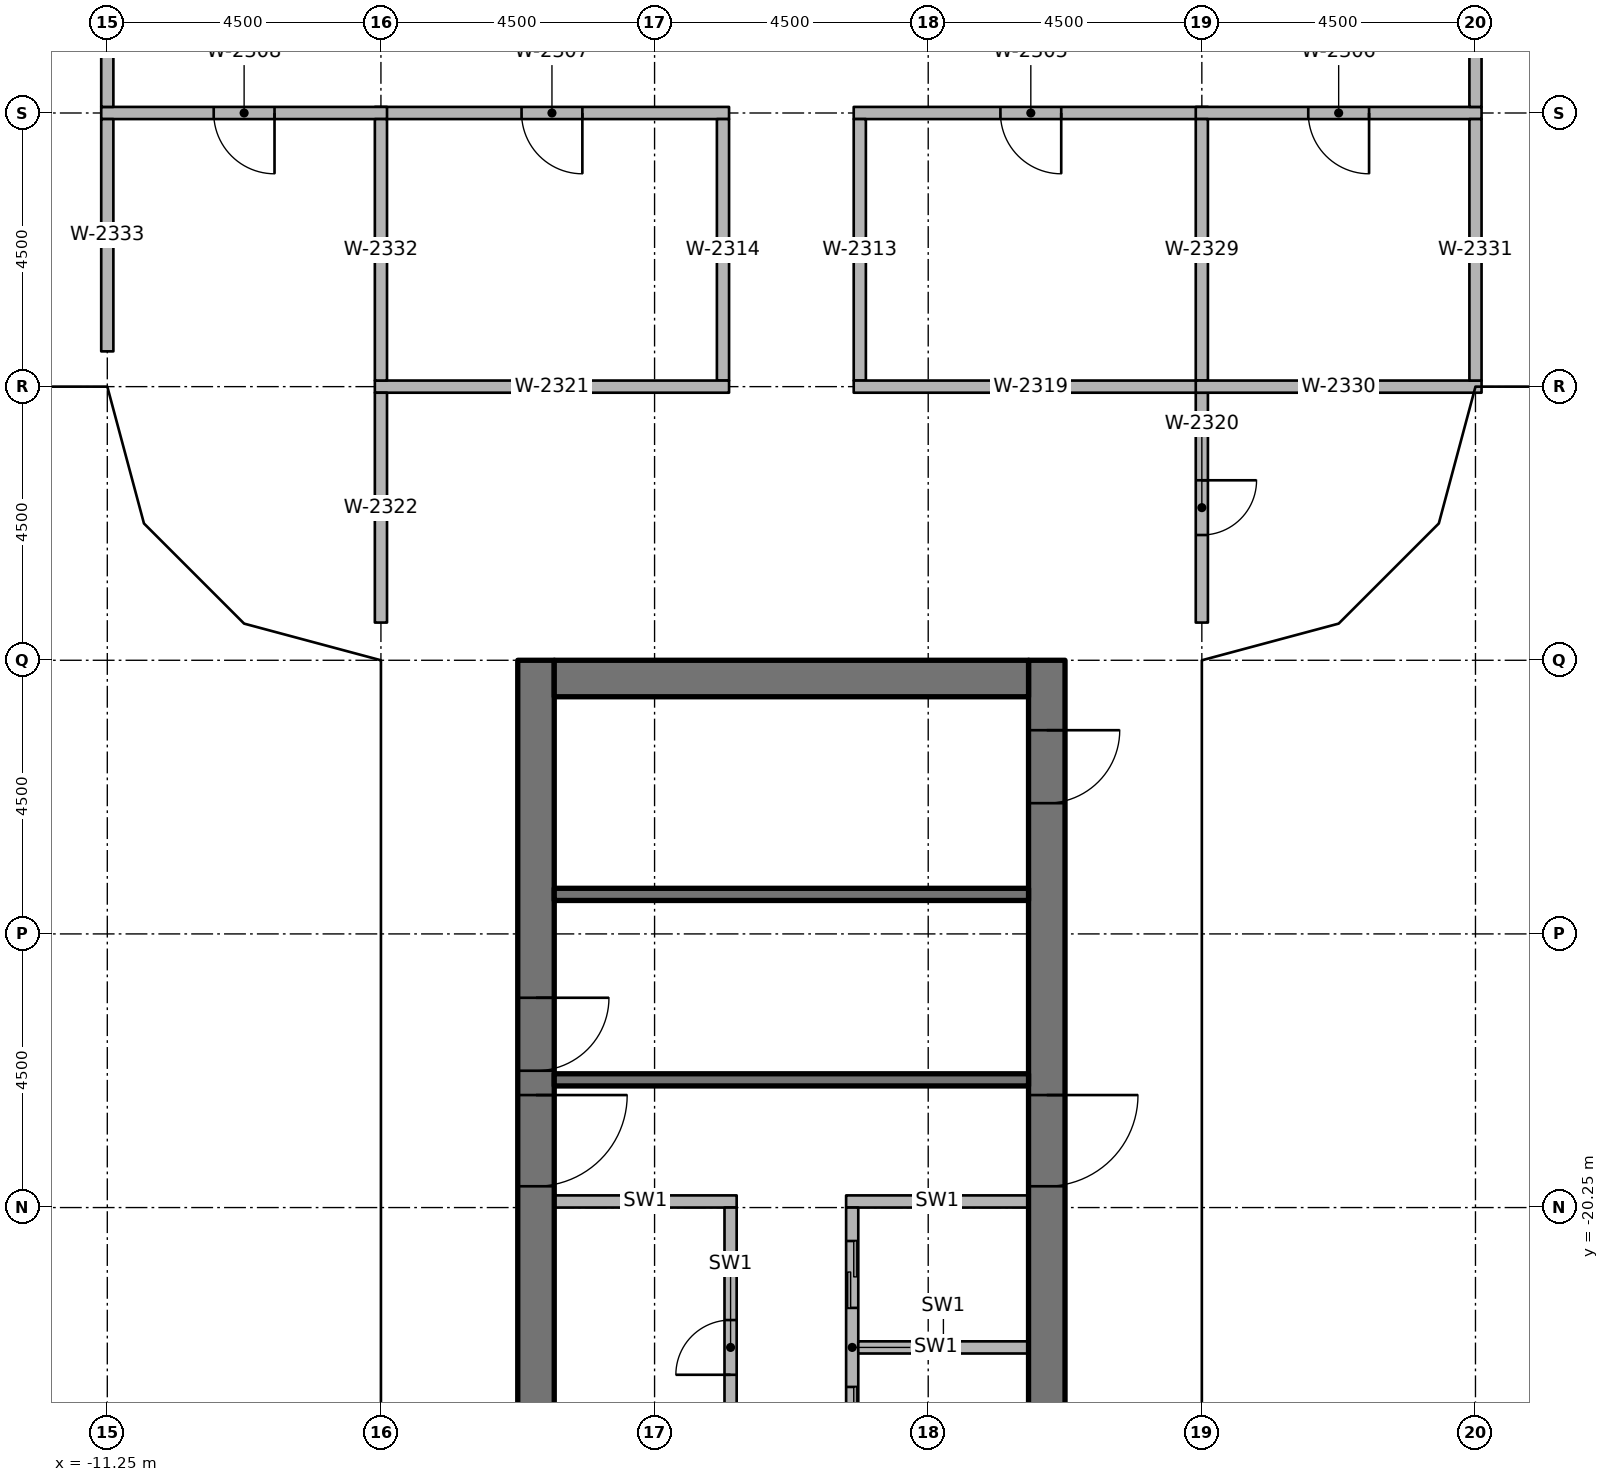
"""IFC4 building model, lengths in metres.
Left out: names, types, materials, properties, quantities, classifications, styles, units other than length and angle.
Written with IfcOpenShell. Run it as: python <this file> out.ifc"""

import sys

from ifc_helpers import new_model, si_unit, direction, frame, frame_2d, origin, origin_2d, place, context, subcontext, project, spatial, rectangle, extrude, element, fill, save


model = new_model("IFC4")
c1 = context("Model", 3, precision=1e-05, world=origin(), true_north=direction((0.0, 1.0)))
c2 = subcontext(c1, "Body", "Model", "MODEL_VIEW")
j1 = project(units=[si_unit("LENGTHUNIT", "METRE"), si_unit("PLANEANGLEUNIT", "RADIAN")], contexts=[c1])
p1 = place(None, origin())
s1 = spatial("IfcSite", under=j1, at=p1, CompositionType="ELEMENT")
p2 = place(p1, origin())
s2 = spatial("IfcBuilding", under=s1, at=p2, CompositionType="ELEMENT")
p3 = place(p2, frame((0.0, 0.0, 218.2)))
s3 = spatial("IfcBuildingStorey", under=s2, at=p3, CompositionType="ELEMENT", Elevation=218.2)
for number, where, z_axis, x_axis in (
    (1, (-10.75, -6.25, 0.0), (0.0, 0.0, 1.0), (1.0, 0.0, 0.0)),
    (2, (-6.25, -20.25, 0.0), (0.0, 0.0, 1.0), (1.0, 0.0, 0.0)),
    (3, (-6.25, -15.75, 0.0), (0.0, 0.0, 1.0), (1.0, 0.0, 0.0)),
    (4, (-6.25, -10.75, 0.0), (0.0, 0.0, 1.0), (1.0, 0.0, 0.0)),
    (5, (-6.25, -6.25, 0.0), (0.0, 0.0, 1.0), (1.0, 0.0, 0.0)),
    (6, (6.25, -20.25, 0.0), (0.0, 0.0, 1.0), (1.0, 0.0, 0.0)),
    (7, (6.25, -15.75, 0.0), (0.0, 0.0, 1.0), (1.0, 0.0, 0.0)),
    (8, (6.25, -10.75, 0.0), (0.0, 0.0, 1.0), (1.0, 0.0, 0.0)),
    (9, (6.25, -6.25, 0.0), (0.0, 0.0, 1.0), (1.0, 0.0, 0.0)),
    (10, (10.75, -6.25, 0.0), (0.0, 0.0, 1.0), (1.0, 0.0, 0.0)),
):
    element("IfcColumn", number, at=place(p3, frame(where, z_axis=z_axis, x_axis=x_axis)), inside=s3, PredefinedType="COLUMN", context=c2, shape_type="SweptSolid", body=[
        extrude(rectangle(XDim=0.7, YDim=0.7, at=origin_2d()), origin(), (0.0, 0.0, 1.0), 3.65),
    ])
p4 = place(p3, frame((-4.2, -11.25, 0.0), z_axis=(0.0, 0.0, 1.0), x_axis=(0.0, -1.0, 0.0)))
e11 = element("IfcWall", 11, at=p4, inside=s3, PredefinedType="SHEAR", context=c2, shape_type="SweptSolid", body=[
    extrude(rectangle(XDim=15.0, YDim=0.6, at=frame_2d((7.5, 0.0))), origin(), (0.0, 0.0, 1.0), 3.8),
])
p5 = place(p4, frame((7.15, 0.0, 0.0)))
e12 = element("IfcOpeningElement", 12, at=p5, cuts=e11, PredefinedType="OPENING", context=c2, shape_type="SweptSolid", body=[
    extrude(rectangle(XDim=1.5, YDim=2.3, at=frame_2d((0.75, 1.15))), frame((0.0, 0.31, 0.0), z_axis=(0.0, -1.0, 0.0), x_axis=(1.0, 0.0, 0.0)), (0.0, 0.0, 1.0), 0.62),
])
p6 = place(p4, frame((5.55, 0.0, 0.0)))
e13 = element("IfcOpeningElement", 13, at=p6, cuts=e11, PredefinedType="OPENING", context=c2, shape_type="SweptSolid", body=[
    extrude(rectangle(XDim=1.2, YDim=2.1, at=frame_2d((0.6, 1.05))), frame((0.0, 0.31, 0.0), z_axis=(0.0, -1.0, 0.0), x_axis=(1.0, 0.0, 0.0)), (0.0, 0.0, 1.0), 0.62),
])
p7 = place(p3, frame((4.2, -11.25, 0.0), z_axis=(0.0, 0.0, 1.0), x_axis=(0.0, -1.0, 0.0)))
e14 = element("IfcWall", 14, at=p7, inside=s3, PredefinedType="SHEAR", context=c2, shape_type="SweptSolid", body=[
    extrude(rectangle(XDim=15.0, YDim=0.6, at=frame_2d((7.5, 0.0))), origin(), (0.0, 0.0, 1.0), 3.8),
])
p8 = place(p7, frame((7.15, 0.0, 0.0)))
e15 = element("IfcOpeningElement", 15, at=p8, cuts=e14, PredefinedType="OPENING", context=c2, shape_type="SweptSolid", body=[
    extrude(rectangle(XDim=1.5, YDim=2.3, at=frame_2d((0.75, 1.15))), frame((0.0, 0.31, 0.0), z_axis=(0.0, -1.0, 0.0), x_axis=(1.0, 0.0, 0.0)), (0.0, 0.0, 1.0), 0.62),
])
p9 = place(p7, frame((13.9, 0.0, 0.0)))
e16 = element("IfcOpeningElement", 16, at=p9, cuts=e14, PredefinedType="OPENING", context=c2, shape_type="SweptSolid", body=[
    extrude(rectangle(XDim=0.9, YDim=2.1, at=frame_2d((0.45, 1.05))), frame((0.0, 0.31, 0.0), z_axis=(0.0, -1.0, 0.0), x_axis=(1.0, 0.0, 0.0)), (0.0, 0.0, 1.0), 0.62),
])
p10 = place(p7, frame((1.15, 0.0, 0.0)))
e17 = element("IfcOpeningElement", 17, at=p10, cuts=e14, PredefinedType="OPENING", context=c2, shape_type="SweptSolid", body=[
    extrude(rectangle(XDim=1.2, YDim=2.1, at=frame_2d((0.6, 1.05))), frame((0.0, 0.31, 0.0), z_axis=(0.0, -1.0, 0.0), x_axis=(1.0, 0.0, 0.0)), (0.0, 0.0, 1.0), 0.62),
])
p11 = place(p3, frame((-3.9, -11.55, 0.0), z_axis=(0.0, 0.0, 1.0), x_axis=(1.0, 0.0, 0.0)))
e18 = element("IfcWall", 18, at=p11, inside=s3, PredefinedType="SHEAR", context=c2, shape_type="SweptSolid", body=[
    extrude(rectangle(XDim=7.8, YDim=0.6, at=frame_2d((3.9, 0.0))), origin(), (0.0, 0.0, 1.0), 3.8),
])
for number, where, z_axis, x_axis in (
    (19, (3.9, -18.15, 0.0), (0.0, 0.0, 1.0), (-1.0, 0.0, 0.0)),
    (20, (3.9, -15.1, 0.0), (0.0, 0.0, 1.0), (-1.0, 0.0, 0.0)),
):
    element("IfcWall", number, at=place(p3, frame(where, z_axis=z_axis, x_axis=x_axis)), inside=s3, PredefinedType="SHEAR", context=c2, shape_type="SweptSolid", body=[
        extrude(rectangle(XDim=7.8, YDim=0.2, at=frame_2d((3.9, 0.0))), origin(), (0.0, 0.0, 1.0), 3.65),
    ])
p12 = place(p3, frame((3.9, -20.15, 0.0), z_axis=(0.0, 0.0, 1.0), x_axis=(-1.0, 0.0, 0.0)))
e21 = element("IfcWall", 21, at=p12, inside=s3, PredefinedType="PARTITIONING", context=c2, shape_type="SweptSolid", body=[
    extrude(rectangle(XDim=3.0, YDim=0.2, at=frame_2d((1.5, 0.0))), origin(), (0.0, 0.0, 1.0), 3.65),
])
p13 = place(p3, frame((1.0, -24.85, 0.0), z_axis=(0.0, 0.0, 1.0), x_axis=(0.0, 1.0, 0.0)))
e22 = element("IfcWall", 22, at=p13, inside=s3, PredefinedType="PARTITIONING", context=c2, shape_type="SweptSolid", body=[
    extrude(rectangle(XDim=4.6, YDim=0.2, at=frame_2d((2.3, 0.0))), origin(), (0.0, 0.0, 1.0), 3.65),
])
p14 = place(p13, frame((0.55, 0.0, 0.0)))
e23 = element("IfcOpeningElement", 23, at=p14, cuts=e22, PredefinedType="OPENING", context=c2, shape_type="SweptSolid", body=[
    extrude(rectangle(XDim=1.1, YDim=2.3, at=frame_2d((0.55, 1.15))), frame((0.0, 0.11, 0.0), z_axis=(0.0, -1.0, 0.0), x_axis=(1.0, 0.0, 0.0)), (0.0, 0.0, 1.0), 0.22),
])
p15 = place(p13, frame((2.95, 0.0, 0.0)))
e24 = element("IfcOpeningElement", 24, at=p15, cuts=e22, PredefinedType="OPENING", context=c2, shape_type="SweptSolid", body=[
    extrude(rectangle(XDim=1.1, YDim=2.3, at=frame_2d((0.55, 1.15))), frame((0.0, 0.11, 0.0), z_axis=(0.0, -1.0, 0.0), x_axis=(1.0, 0.0, 0.0)), (0.0, 0.0, 1.0), 0.22),
])
p16 = place(p3, frame((-0.9, -20.15, 0.0), z_axis=(0.0, 0.0, 1.0), x_axis=(-1.0, 0.0, 0.0)))
e25 = element("IfcWall", 25, at=p16, inside=s3, PredefinedType="PARTITIONING", context=c2, shape_type="SweptSolid", body=[
    extrude(rectangle(XDim=3.0, YDim=0.2, at=frame_2d((1.5, 0.0))), origin(), (0.0, 0.0, 1.0), 3.65),
])
p17 = place(p3, frame((-1.0, -24.85, 0.0), z_axis=(0.0, 0.0, 1.0), x_axis=(0.0, 1.0, 0.0)))
e26 = element("IfcWall", 26, at=p17, inside=s3, PredefinedType="PARTITIONING", context=c2, shape_type="SweptSolid", body=[
    extrude(rectangle(XDim=4.6, YDim=0.2, at=frame_2d((2.3, 0.0))), origin(), (0.0, 0.0, 1.0), 3.65),
])
p18 = place(p17, frame((1.85, 0.0, 0.0)))
e27 = element("IfcOpeningElement", 27, at=p18, cuts=e26, PredefinedType="OPENING", context=c2, shape_type="SweptSolid", body=[
    extrude(rectangle(XDim=0.9, YDim=2.1, at=frame_2d((0.45, 1.05))), frame((0.0, 0.11, 0.0), z_axis=(0.0, -1.0, 0.0), x_axis=(1.0, 0.0, 0.0)), (0.0, 0.0, 1.0), 0.22),
])
p19 = place(p3, frame((3.9, -22.55, 0.0), z_axis=(0.0, 0.0, 1.0), x_axis=(-1.0, 0.0, 0.0)))
e28 = element("IfcWall", 28, at=p19, inside=s3, PredefinedType="PARTITIONING", context=c2, shape_type="SweptSolid", body=[
    extrude(rectangle(XDim=2.8, YDim=0.2, at=frame_2d((1.4, 0.0))), origin(), (0.0, 0.0, 1.0), 3.65),
])
p20 = place(p3, frame((6.85, -2.25, 0.0), z_axis=(0.0, 0.0, 1.0), x_axis=(-1.0, 0.0, 0.0)))
e29 = element("IfcWall", 29, at=p20, inside=s3, PredefinedType="PARTITIONING", context=c2, shape_type="SweptSolid", body=[
    extrude(rectangle(XDim=5.825, YDim=0.2, at=frame_2d((2.913, 0.0))), origin(), (0.0, 0.0, 1.0), 2.75),
])
p21 = place(p20, frame((2.413, 0.0, 0.0)))
e30 = element("IfcOpeningElement", 30, at=p21, cuts=e29, PredefinedType="OPENING", context=c2, shape_type="SweptSolid", body=[
    extrude(rectangle(XDim=1.0, YDim=2.1, at=frame_2d((0.5, 1.05))), frame((0.0, 0.11, 0.0), z_axis=(0.0, -1.0, 0.0), x_axis=(1.0, 0.0, 0.0)), (0.0, 0.0, 1.0), 0.22),
])
p22 = place(p3, frame((11.35, -2.25, 0.0), z_axis=(0.0, 0.0, 1.0), x_axis=(-1.0, 0.0, 0.0)))
e31 = element("IfcWall", 31, at=p22, inside=s3, PredefinedType="PARTITIONING", context=c2, shape_type="SweptSolid", body=[
    extrude(rectangle(XDim=4.7, YDim=0.2, at=frame_2d((2.35, 0.0))), origin(), (0.0, 0.0, 1.0), 2.75),
])
p23 = place(p22, frame((1.85, 0.0, 0.0)))
e32 = element("IfcOpeningElement", 32, at=p23, cuts=e31, PredefinedType="OPENING", context=c2, shape_type="SweptSolid", body=[
    extrude(rectangle(XDim=1.0, YDim=2.1, at=frame_2d((0.5, 1.05))), frame((0.0, 0.11, 0.0), z_axis=(0.0, -1.0, 0.0), x_axis=(1.0, 0.0, 0.0)), (0.0, 0.0, 1.0), 0.22),
])
p24 = place(p3, frame((-1.025, -2.25, 0.0), z_axis=(0.0, 0.0, 1.0), x_axis=(-1.0, 0.0, 0.0)))
e33 = element("IfcWall", 33, at=p24, inside=s3, PredefinedType="PARTITIONING", context=c2, shape_type="SweptSolid", body=[
    extrude(rectangle(XDim=5.825, YDim=0.2, at=frame_2d((2.913, 0.0))), origin(), (0.0, 0.0, 1.0), 2.75),
])
p25 = place(p24, frame((2.413, 0.0, 0.0)))
e34 = element("IfcOpeningElement", 34, at=p25, cuts=e33, PredefinedType="OPENING", context=c2, shape_type="SweptSolid", body=[
    extrude(rectangle(XDim=1.0, YDim=2.1, at=frame_2d((0.5, 1.05))), frame((0.0, 0.11, 0.0), z_axis=(0.0, -1.0, 0.0), x_axis=(1.0, 0.0, 0.0)), (0.0, 0.0, 1.0), 0.22),
])
p26 = place(p3, frame((-6.65, -2.25, 0.0), z_axis=(0.0, 0.0, 1.0), x_axis=(-1.0, 0.0, 0.0)))
e35 = element("IfcWall", 35, at=p26, inside=s3, PredefinedType="PARTITIONING", context=c2, shape_type="SweptSolid", body=[
    extrude(rectangle(XDim=4.7, YDim=0.2, at=frame_2d((2.35, 0.0))), origin(), (0.0, 0.0, 1.0), 2.75),
])
p27 = place(p26, frame((1.85, 0.0, 0.0)))
e36 = element("IfcOpeningElement", 36, at=p27, cuts=e35, PredefinedType="OPENING", context=c2, shape_type="SweptSolid", body=[
    extrude(rectangle(XDim=1.0, YDim=2.1, at=frame_2d((0.5, 1.05))), frame((0.0, 0.11, 0.0), z_axis=(0.0, -1.0, 0.0), x_axis=(1.0, 0.0, 0.0)), (0.0, 0.0, 1.0), 0.22),
])
for number, where, z_axis, x_axis in (
    (37, (11.25, -2.15, 0.0), (0.0, 0.0, 1.0), (0.0, 1.0, 0.0)),
    (38, (-11.25, -2.15, 0.0), (0.0, 0.0, 1.0), (0.0, 1.0, 0.0)),
):
    element("IfcWall", number, at=place(p3, frame(where, z_axis=z_axis, x_axis=x_axis)), inside=s3, PredefinedType="PARTITIONING", context=c2, shape_type="SweptSolid", body=[
        extrude(rectangle(XDim=2.05, YDim=0.2, at=frame_2d((1.025, 0.0))), origin(), (0.0, 0.0, 1.0), 2.75),
    ])
for number, where, z_axis, x_axis in (
    (39, (1.125, -6.65, 0.0), (0.0, 0.0, 1.0), (0.0, 1.0, 0.0)),
    (40, (-1.125, -6.65, 0.0), (0.0, 0.0, 1.0), (0.0, 1.0, 0.0)),
):
    element("IfcWall", number, at=place(p3, frame(where, z_axis=z_axis, x_axis=x_axis)), inside=s3, PredefinedType="PARTITIONING", context=c2, shape_type="SweptSolid", body=[
        extrude(rectangle(XDim=4.3, YDim=0.2, at=frame_2d((2.15, 0.0))), origin(), (0.0, 0.0, 1.0), 2.75),
    ])
p28 = place(p3, frame((1.025, -6.75, 0.0), z_axis=(0.0, 0.0, 1.0), x_axis=(1.0, 0.0, 0.0)))
e41 = element("IfcWall", 41, at=p28, inside=s3, PredefinedType="PARTITIONING", context=c2, shape_type="SweptSolid", body=[
    extrude(rectangle(XDim=5.825, YDim=0.2, at=frame_2d((2.913, 0.0))), origin(), (0.0, 0.0, 1.0), 2.75),
])
p29 = place(p3, frame((6.75, -6.85, 0.0), z_axis=(0.0, 0.0, 1.0), x_axis=(0.0, -1.0, 0.0)))
e42 = element("IfcWall", 42, at=p29, inside=s3, PredefinedType="PARTITIONING", context=c2, shape_type="SweptSolid", body=[
    extrude(rectangle(XDim=3.78, YDim=0.2, at=frame_2d((1.89, 0.0))), origin(), (0.0, 0.0, 1.0), 2.75),
])
p30 = place(p29, frame((1.44, 0.0, 0.0)))
e43 = element("IfcOpeningElement", 43, at=p30, cuts=e42, PredefinedType="OPENING", context=c2, shape_type="SweptSolid", body=[
    extrude(rectangle(XDim=0.9, YDim=2.1, at=frame_2d((0.45, 1.05))), frame((0.0, 0.11, 0.0), z_axis=(0.0, -1.0, 0.0), x_axis=(1.0, 0.0, 0.0)), (0.0, 0.0, 1.0), 0.22),
])
p31 = place(p3, frame((-6.85, -6.75, 0.0), z_axis=(0.0, 0.0, 1.0), x_axis=(1.0, 0.0, 0.0)))
e44 = element("IfcWall", 44, at=p31, inside=s3, PredefinedType="PARTITIONING", context=c2, shape_type="SweptSolid", body=[
    extrude(rectangle(XDim=5.825, YDim=0.2, at=frame_2d((2.913, 0.0))), origin(), (0.0, 0.0, 1.0), 2.75),
])
p32 = place(p3, frame((-6.75, -10.63, 0.0), z_axis=(0.0, 0.0, 1.0), x_axis=(0.0, 1.0, 0.0)))
e45 = element("IfcWall", 45, at=p32, inside=s3, PredefinedType="PARTITIONING", context=c2, shape_type="SweptSolid", body=[
    extrude(rectangle(XDim=3.78, YDim=0.2, at=frame_2d((1.89, 0.0))), origin(), (0.0, 0.0, 1.0), 2.75),
])
p33 = place(p3, frame((6.75, -6.65, 0.0), z_axis=(0.0, 0.0, 1.0), x_axis=(0.0, 1.0, 0.0)))
e46 = element("IfcWall", 46, at=p33, inside=s3, PredefinedType="PARTITIONING", context=c2, shape_type="SweptSolid", body=[
    extrude(rectangle(XDim=4.3, YDim=0.2, at=frame_2d((2.15, 0.0))), origin(), (0.0, 0.0, 1.0), 2.75),
])
p34 = place(p3, frame((6.65, -6.75, 0.0), z_axis=(0.0, 0.0, 1.0), x_axis=(1.0, 0.0, 0.0)))
e47 = element("IfcWall", 47, at=p34, inside=s3, PredefinedType="PARTITIONING", context=c2, shape_type="SweptSolid", body=[
    extrude(rectangle(XDim=4.7, YDim=0.2, at=frame_2d((2.35, 0.0))), origin(), (0.0, 0.0, 1.0), 2.75),
])
for number, where, z_axis, x_axis in (
    (48, (11.25, -6.65, 0.0), (0.0, 0.0, 1.0), (0.0, 1.0, 0.0)),
    (49, (-6.75, -6.65, 0.0), (0.0, 0.0, 1.0), (0.0, 1.0, 0.0)),
):
    element("IfcWall", number, at=place(p3, frame(where, z_axis=z_axis, x_axis=x_axis)), inside=s3, PredefinedType="PARTITIONING", context=c2, shape_type="SweptSolid", body=[
        extrude(rectangle(XDim=4.3, YDim=0.2, at=frame_2d((2.15, 0.0))), origin(), (0.0, 0.0, 1.0), 2.75),
    ])
p35 = place(p3, frame((-11.25, -6.17, 0.0), z_axis=(0.0, 0.0, 1.0), x_axis=(0.0, 1.0, 0.0)))
e50 = element("IfcWall", 50, at=p35, inside=s3, PredefinedType="PARTITIONING", context=c2, shape_type="SweptSolid", body=[
    extrude(rectangle(XDim=3.82, YDim=0.2, at=frame_2d((1.91, 0.0))), origin(), (0.0, 0.0, 1.0), 2.75),
])
p36 = place(p8, origin())
e51 = element("IfcDoor", 51, at=p36, inside=s3, OperationType="DOUBLE_DOOR_SINGLE_SWING", PredefinedType="DOOR", context=c2, shape_type="SweptSolid", body=[
    extrude(rectangle(XDim=1.5, YDim=2.3, at=frame_2d((0.75, 1.15))), frame((0.0, 0.025, 0.0), z_axis=(0.0, -1.0, 0.0), x_axis=(1.0, 0.0, 0.0)), (0.0, 0.0, 1.0), 0.05),
])
fill(e15, e51)
p37 = place(p5, origin())
e52 = element("IfcDoor", 52, at=p37, inside=s3, OperationType="DOUBLE_DOOR_SINGLE_SWING", PredefinedType="DOOR", context=c2, shape_type="SweptSolid", body=[
    extrude(rectangle(XDim=1.5, YDim=2.3, at=frame_2d((0.75, 1.15))), frame((0.0, 0.025, 0.0), z_axis=(0.0, -1.0, 0.0), x_axis=(1.0, 0.0, 0.0)), (0.0, 0.0, 1.0), 0.05),
])
fill(e12, e52)
p38 = place(p6, origin())
e53 = element("IfcDoor", 53, at=p38, inside=s3, OperationType="SINGLE_SWING_RIGHT", PredefinedType="DOOR", context=c2, shape_type="SweptSolid", body=[
    extrude(rectangle(XDim=1.2, YDim=2.1, at=frame_2d((0.6, 1.05))), frame((0.0, 0.025, 0.0), z_axis=(0.0, -1.0, 0.0), x_axis=(1.0, 0.0, 0.0)), (0.0, 0.0, 1.0), 0.05),
])
fill(e13, e53)
p39 = place(p10, origin())
e54 = element("IfcDoor", 54, at=p39, inside=s3, OperationType="SINGLE_SWING_RIGHT", PredefinedType="DOOR", context=c2, shape_type="SweptSolid", body=[
    extrude(rectangle(XDim=1.2, YDim=2.1, at=frame_2d((0.6, 1.05))), frame((0.0, 0.025, 0.0), z_axis=(0.0, -1.0, 0.0), x_axis=(1.0, 0.0, 0.0)), (0.0, 0.0, 1.0), 0.05),
])
fill(e17, e54)
p40 = place(p14, origin())
e55 = element("IfcDoor", 55, at=p40, inside=s3, OperationType="DOUBLE_DOOR_SLIDING", PredefinedType="DOOR", context=c2, shape_type="SweptSolid", body=[
    extrude(rectangle(XDim=1.1, YDim=2.3, at=frame_2d((0.55, 1.15))), frame((0.0, 0.025, 0.0), z_axis=(0.0, -1.0, 0.0), x_axis=(1.0, 0.0, 0.0)), (0.0, 0.0, 1.0), 0.05),
])
fill(e23, e55)
p41 = place(p15, origin())
e56 = element("IfcDoor", 56, at=p41, inside=s3, OperationType="DOUBLE_DOOR_SLIDING", PredefinedType="DOOR", context=c2, shape_type="SweptSolid", body=[
    extrude(rectangle(XDim=1.1, YDim=2.3, at=frame_2d((0.55, 1.15))), frame((0.0, 0.025, 0.0), z_axis=(0.0, -1.0, 0.0), x_axis=(1.0, 0.0, 0.0)), (0.0, 0.0, 1.0), 0.05),
])
fill(e24, e56)
p42 = place(p18, origin())
e57 = element("IfcDoor", 57, at=p42, inside=s3, OperationType="SINGLE_SWING_RIGHT", PredefinedType="DOOR", context=c2, shape_type="SweptSolid", body=[
    extrude(rectangle(XDim=0.9, YDim=2.1, at=frame_2d((0.45, 1.05))), frame((0.0, 0.025, 0.0), z_axis=(0.0, -1.0, 0.0), x_axis=(1.0, 0.0, 0.0)), (0.0, 0.0, 1.0), 0.05),
])
fill(e27, e57)
p43 = place(p21, origin())
e58 = element("IfcDoor", 58, at=p43, inside=s3, OperationType="SINGLE_SWING_RIGHT", PredefinedType="DOOR", context=c2, shape_type="SweptSolid", body=[
    extrude(rectangle(XDim=1.0, YDim=2.1, at=frame_2d((0.5, 1.05))), frame((0.0, 0.025, 0.0), z_axis=(0.0, -1.0, 0.0), x_axis=(1.0, 0.0, 0.0)), (0.0, 0.0, 1.0), 0.05),
])
fill(e30, e58)
p44 = place(p23, origin())
e59 = element("IfcDoor", 59, at=p44, inside=s3, OperationType="SINGLE_SWING_RIGHT", PredefinedType="DOOR", context=c2, shape_type="SweptSolid", body=[
    extrude(rectangle(XDim=1.0, YDim=2.1, at=frame_2d((0.5, 1.05))), frame((0.0, 0.025, 0.0), z_axis=(0.0, -1.0, 0.0), x_axis=(1.0, 0.0, 0.0)), (0.0, 0.0, 1.0), 0.05),
])
fill(e32, e59)
p45 = place(p30, origin())
e60 = element("IfcDoor", 60, at=p45, inside=s3, OperationType="SINGLE_SWING_LEFT", PredefinedType="DOOR", context=c2, shape_type="SweptSolid", body=[
    extrude(rectangle(XDim=0.9, YDim=2.1, at=frame_2d((0.45, 1.05))), frame((0.0, 0.025, 0.0), z_axis=(0.0, -1.0, 0.0), x_axis=(1.0, 0.0, 0.0)), (0.0, 0.0, 1.0), 0.05),
])
fill(e43, e60)
p46 = place(p25, origin())
e61 = element("IfcDoor", 61, at=p46, inside=s3, OperationType="SINGLE_SWING_RIGHT", PredefinedType="DOOR", context=c2, shape_type="SweptSolid", body=[
    extrude(rectangle(XDim=1.0, YDim=2.1, at=frame_2d((0.5, 1.05))), frame((0.0, 0.025, 0.0), z_axis=(0.0, -1.0, 0.0), x_axis=(1.0, 0.0, 0.0)), (0.0, 0.0, 1.0), 0.05),
])
fill(e34, e61)
p47 = place(p27, origin())
e62 = element("IfcDoor", 62, at=p47, inside=s3, OperationType="SINGLE_SWING_RIGHT", PredefinedType="DOOR", context=c2, shape_type="SweptSolid", body=[
    extrude(rectangle(XDim=1.0, YDim=2.1, at=frame_2d((0.5, 1.05))), frame((0.0, 0.025, 0.0), z_axis=(0.0, -1.0, 0.0), x_axis=(1.0, 0.0, 0.0)), (0.0, 0.0, 1.0), 0.05),
])
fill(e36, e62)
save(model, sys.argv[1])
